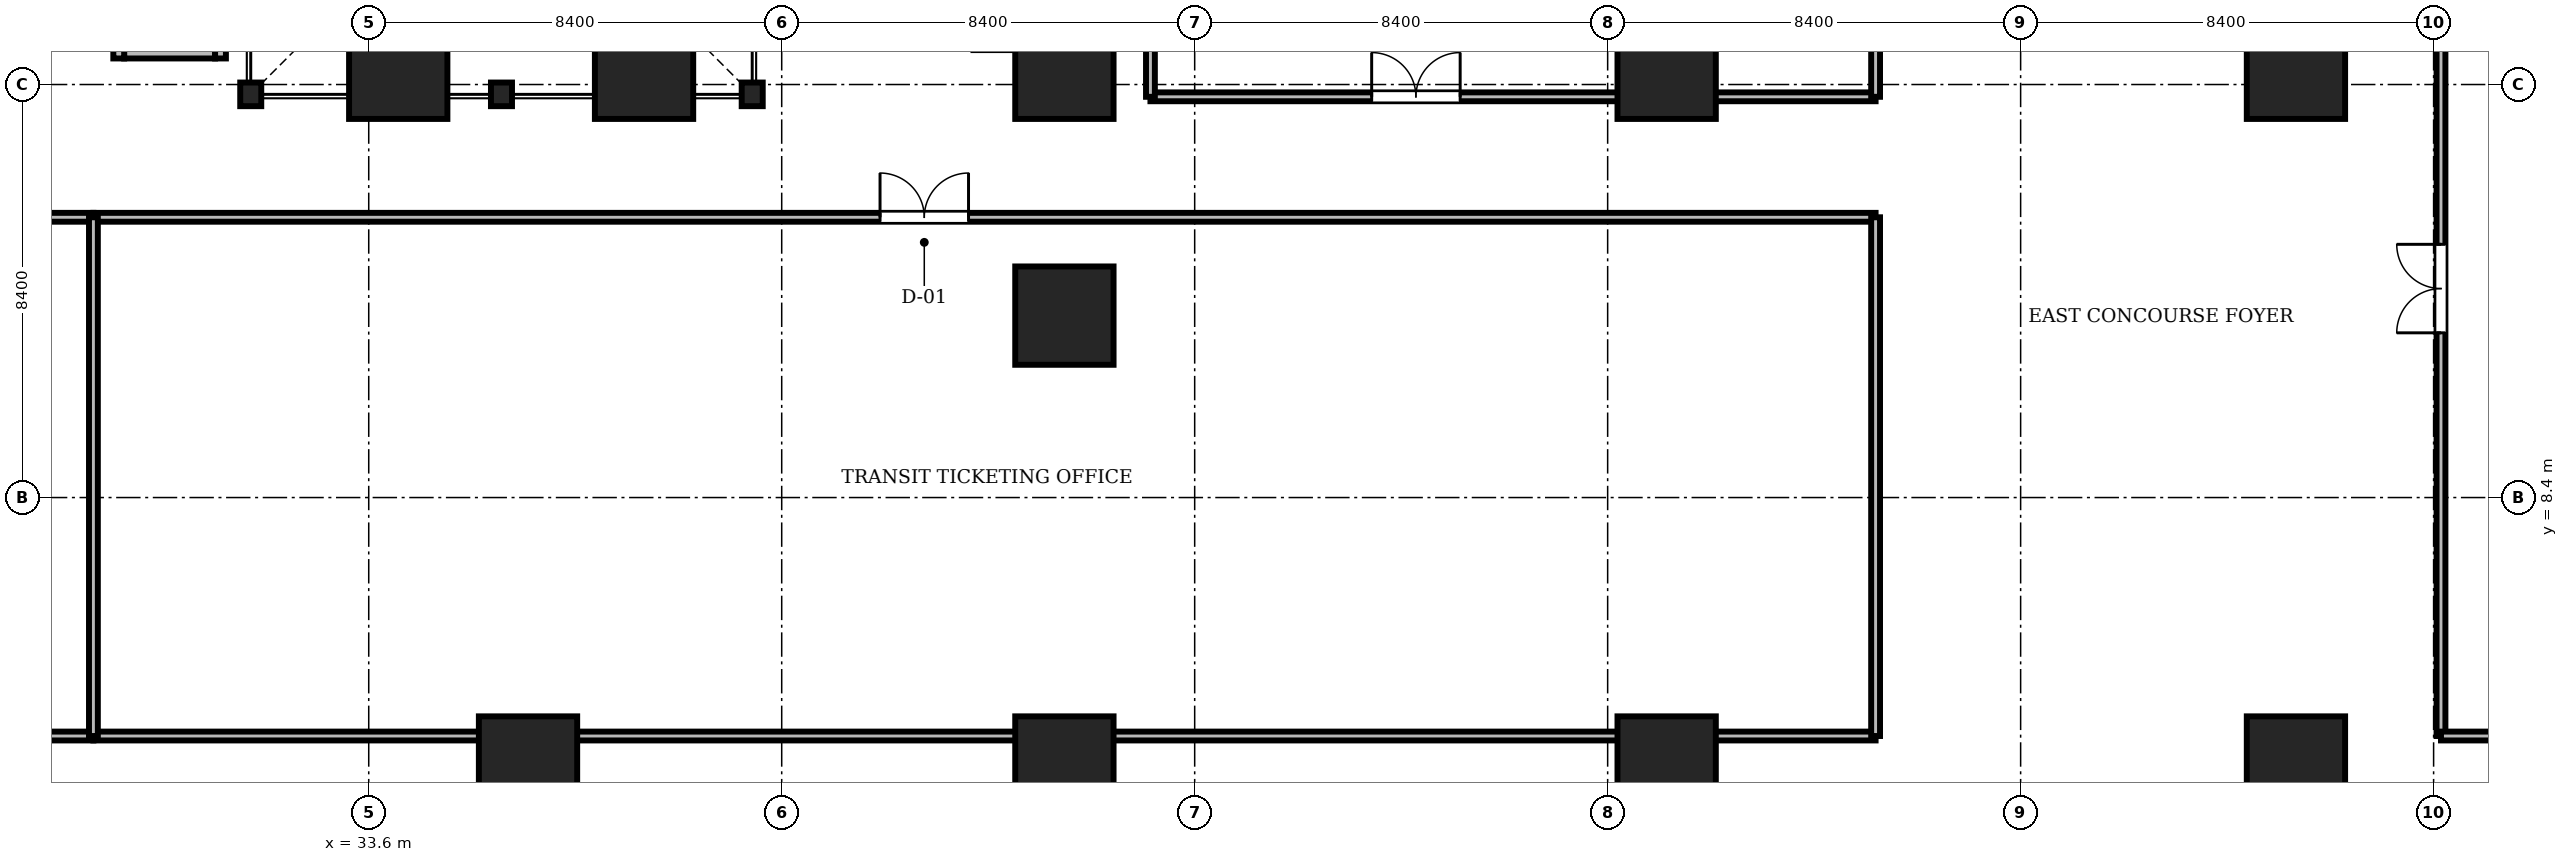
"""IFC4 building model, lengths in metres.
Left out: names, types, materials, properties, quantities, classifications, styles, units other than length and angle.
Written with IfcOpenShell. Run it as: python <this file> out.ifc"""

import sys

from ifc_helpers import new_model, si_unit, direction, frame, frame_2d, origin, origin_2d, place, context, subcontext, project, spatial, rectangle, i_section, extrude, source, transform, mapped, element, fill, save


model = new_model("IFC4")
c1 = context("Model", 3, precision=1e-05, world=origin(), true_north=direction((0.0, 1.0)))
c2 = subcontext(c1, "Body", "Model", "MODEL_VIEW")
j1 = project(units=[si_unit("LENGTHUNIT", "METRE"), si_unit("PLANEANGLEUNIT", "RADIAN")], contexts=[c1])
p1 = place(None, origin())
s1 = spatial("IfcSite", under=j1, at=p1, CompositionType="ELEMENT")
p2 = place(p1, origin())
s2 = spatial("IfcBuilding", under=s1, at=p2, CompositionType="ELEMENT")
p3 = place(p2, frame((0.0, 0.0, 6.0)))
s3 = spatial("IfcBuildingStorey", under=s2, at=p3, CompositionType="ELEMENT", Elevation=6.0)
m1 = source(origin(), c2, "Body", "SweptSolid", [
    extrude(i_section(OverallWidth=0.428, OverallDepth=0.481, WebThickness=0.04, FlangeThickness=0.063, FilletRadius=0.015, at=origin_2d()), origin(), (0.0, 0.0, 1.0), 5.0),
])
for number, where, z_axis, x_axis in (
    (1, (31.2, 16.6, 0.0), (0.0, 0.0, 1.0), (1.0, 0.0, 0.0)),
    (2, (36.3, 16.6, 0.0), (0.0, 0.0, 1.0), (1.0, 0.0, 0.0)),
    (3, (41.4, 16.6, 0.0), (0.0, 0.0, 1.0), (1.0, 0.0, 0.0)),
):
    element("IfcColumn", number, at=place(p3, frame(where, z_axis=z_axis, x_axis=x_axis)), inside=s3, PredefinedType="COLUMN", context=c2, shape_type="MappedRepresentation", body=[
        mapped(m1, transform((0.0, 0.0, 0.0), scale=1.0)),
    ])
m2 = source(origin(), c2, "Body", "SweptSolid", [
    extrude(rectangle(XDim=2.0, YDim=2.0, at=origin_2d()), origin(), (0.0, 0.0, 1.0), 5.0),
])
for number, where, z_axis, x_axis in (
    (4, (36.84, 2.95, 0.0), (0.0, 0.0, 1.0), (1.0, 0.0, 0.0)),
    (5, (47.75, 2.95, 0.0), (0.0, 0.0, 1.0), (1.0, 0.0, 0.0)),
    (6, (60.0, 2.95, 0.0), (0.0, 0.0, 1.0), (1.0, 0.0, 0.0)),
    (7, (72.8, 2.95, 0.0), (0.0, 0.0, 1.0), (1.0, 0.0, 0.0)),
    (8, (47.75, 12.1, 0.0), (0.0, 0.0, 1.0), (1.0, 0.0, 0.0)),
    (9, (34.2, 17.1, 0.0), (0.0, 0.0, 1.0), (1.0, 0.0, 0.0)),
    (10, (39.2, 17.1, 0.0), (0.0, 0.0, 1.0), (1.0, 0.0, 0.0)),
    (11, (47.75, 17.1, 0.0), (0.0, 0.0, 1.0), (1.0, 0.0, 0.0)),
    (12, (60.0, 17.1, 0.0), (0.0, 0.0, 1.0), (1.0, 0.0, 0.0)),
    (13, (72.8, 17.1, 0.0), (0.0, 0.0, 1.0), (1.0, 0.0, 0.0)),
):
    element("IfcColumn", number, at=place(p3, frame(where, z_axis=z_axis, x_axis=x_axis)), inside=s3, PredefinedType="COLUMN", context=c2, shape_type="MappedRepresentation", body=[
        mapped(m2, transform((0.0, 0.0, 0.0), scale=1.0)),
    ])
m3 = source(origin(), c2, "Body", "SweptSolid", [
    extrude(rectangle(XDim=1.85, YDim=0.22, at=frame_2d((0.925, 0.0))), origin(), (0.0, 0.0, 1.0), 5.0),
])
p4 = place(p3, frame((28.625, 17.44, 0.0), z_axis=(0.0, 0.0, 1.0), x_axis=(1.0, 0.0, 0.0)))
e14 = element("IfcWall", 14, at=p4, inside=s3, PredefinedType="SOLIDWALL", context=c2, shape_type="MappedRepresentation", body=[
    mapped(m3, transform((0.0, 0.0, 0.0), scale=1.0)),
])
m4 = source(origin(), c2, "Body", "SweptSolid", [
    extrude(rectangle(XDim=2.54, YDim=0.22, at=frame_2d((1.27, 0.0))), origin(), (0.0, 0.0, 1.0), 5.0),
])
for number, where, z_axis, x_axis in (
    (15, (28.515, 17.33, 0.0), (0.0, 0.0, 1.0), (0.0, 1.0, 0.0)),
    (16, (30.585, 17.33, 0.0), (0.0, 0.0, 1.0), (0.0, 1.0, 0.0)),
):
    element("IfcWall", number, at=place(p3, frame(where, z_axis=z_axis, x_axis=x_axis)), inside=s3, PredefinedType="SOLIDWALL", context=c2, shape_type="MappedRepresentation", body=[
        mapped(m4, transform((0.0, 0.0, 0.0), scale=1.0)),
    ])
m5 = source(origin(), c2, "Body", "SweptSolid", [
    extrude(rectangle(XDim=36.25, YDim=0.18, at=frame_2d((18.125, 0.0))), origin(), (0.0, 0.0, 1.0), 4.392),
])
p5 = place(p3, frame((28.0, 14.1, 0.0), z_axis=(0.0, 0.0, 1.0), x_axis=(1.0, 0.0, 0.0)))
e17 = element("IfcWall", 17, at=p5, inside=s3, PredefinedType="PARTITIONING", context=c2, shape_type="MappedRepresentation", body=[
    mapped(m5, transform((0.0, 0.0, 0.0), scale=1.0)),
])
m6 = source(origin(), c2, "Body", "SweptSolid", [
    extrude(rectangle(XDim=1.8, YDim=2.4, at=frame_2d((0.9, 1.2))), frame((0.0, 0.1, 0.0), z_axis=(0.0, -1.0, 0.0), x_axis=(1.0, 0.0, 0.0)), (0.0, 0.0, 1.0), 0.2),
])
p6 = place(p5, frame((16.0, 0.0, 0.0)))
e18 = element("IfcOpeningElement", 18, at=p6, cuts=e17, PredefinedType="OPENING", context=c2, shape_type="MappedRepresentation", body=[
    mapped(m6, transform((0.0, 0.0, 0.0), scale=1.0)),
])
m7 = source(origin(), c2, "Body", "SweptSolid", [
    extrude(rectangle(XDim=25.7, YDim=0.18, at=frame_2d((12.85, 0.0))), origin(), (0.0, 0.0, 1.0), 4.468),
])
p7 = place(p3, frame((75.75, 3.55, 0.0), z_axis=(0.0, 0.0, 1.0), x_axis=(0.0, 1.0, 0.0)))
e19 = element("IfcWall", 19, at=p7, inside=s3, PredefinedType="PARTITIONING", context=c2, shape_type="MappedRepresentation", body=[
    mapped(m7, transform((0.0, 0.0, 0.0), scale=1.0)),
])
p8 = place(p7, frame((8.2, 0.0, 0.0)))
e20 = element("IfcOpeningElement", 20, at=p8, cuts=e19, PredefinedType="OPENING", context=c2, shape_type="MappedRepresentation", body=[
    mapped(m6, transform((0.0, 0.0, 0.0), scale=1.0)),
])
m8 = source(origin(), c2, "Body", "SweptSolid", [
    extrude(rectangle(XDim=24.25, YDim=0.18, at=frame_2d((12.125, 0.0))), origin(), (0.0, 0.0, 1.0), 4.392),
])
p9 = place(p3, frame((3.75, 14.1, 0.0), z_axis=(0.0, 0.0, 1.0), x_axis=(1.0, 0.0, 0.0)))
e21 = element("IfcWall", 21, at=p9, inside=s3, PredefinedType="PARTITIONING", context=c2, shape_type="MappedRepresentation", body=[
    mapped(m8, transform((0.0, 0.0, 0.0), scale=1.0)),
])
p10 = place(p9, frame((18.0, 0.0, 0.0)))
e22 = element("IfcOpeningElement", 22, at=p10, cuts=e21, PredefinedType="OPENING", context=c2, shape_type="MappedRepresentation", body=[
    mapped(m6, transform((0.0, 0.0, 0.0), scale=1.0)),
])
m9 = source(origin(), c2, "Body", "SweptSolid", [
    extrude(rectangle(XDim=14.75, YDim=0.18, at=frame_2d((7.375, 0.0))), origin(), (0.0, 0.0, 1.0), 4.392),
])
p11 = place(p3, frame((49.5, 16.55, 0.0), z_axis=(0.0, 0.0, 1.0), x_axis=(1.0, 0.0, 0.0)))
e23 = element("IfcWall", 23, at=p11, inside=s3, PredefinedType="PARTITIONING", context=c2, shape_type="MappedRepresentation", body=[
    mapped(m9, transform((0.0, 0.0, 0.0), scale=1.0)),
])
p12 = place(p11, frame((4.5, 0.0, 0.0)))
e24 = element("IfcOpeningElement", 24, at=p12, cuts=e23, PredefinedType="OPENING", context=c2, shape_type="MappedRepresentation", body=[
    mapped(m6, transform((0.0, 0.0, 0.0), scale=1.0)),
])
p13 = place(p3, frame((28.0, 3.55, 0.0), z_axis=(0.0, 0.0, 1.0), x_axis=(1.0, 0.0, 0.0)))
e25 = element("IfcWall", 25, at=p13, inside=s3, PredefinedType="PARTITIONING", context=c2, shape_type="MappedRepresentation", body=[
    mapped(m5, transform((0.0, 0.0, 0.0), scale=1.0)),
])
p14 = place(p3, frame((3.75, 3.55, 0.0), z_axis=(0.0, 0.0, 1.0), x_axis=(1.0, 0.0, 0.0)))
e26 = element("IfcWall", 26, at=p14, inside=s3, PredefinedType="PARTITIONING", context=c2, shape_type="MappedRepresentation", body=[
    mapped(m8, transform((0.0, 0.0, 0.0), scale=1.0)),
])
m10 = source(origin(), c2, "Body", "SweptSolid", [
    extrude(rectangle(XDim=11.75, YDim=0.18, at=frame_2d((5.875, 0.0))), origin(), (0.0, 0.0, 1.0), 4.468),
])
for number, where, z_axis, x_axis in (
    (27, (49.5, 16.55, 0.0), (0.0, 0.0, 1.0), (0.0, 1.0, 0.0)),
    (28, (64.25, 16.55, 0.0), (0.0, 0.0, 1.0), (0.0, 1.0, 0.0)),
):
    element("IfcWall", number, at=place(p3, frame(where, z_axis=z_axis, x_axis=x_axis)), inside=s3, PredefinedType="PARTITIONING", context=c2, shape_type="MappedRepresentation", body=[
        mapped(m10, transform((0.0, 0.0, 0.0), scale=1.0)),
    ])
m11 = source(origin(), c2, "Body", "SweptSolid", [
    extrude(rectangle(XDim=10.55, YDim=0.18, at=frame_2d((5.275, 0.0))), origin(), (0.0, 0.0, 1.0), 5.0),
])
p15 = place(p3, frame((28.0, 3.55, 0.0), z_axis=(0.0, 0.0, 1.0), x_axis=(0.0, 1.0, 0.0)))
e29 = element("IfcWall", 29, at=p15, inside=s3, PredefinedType="PARTITIONING", context=c2, shape_type="MappedRepresentation", body=[
    mapped(m11, transform((0.0, 0.0, 0.0), scale=1.0)),
])
m12 = source(origin(), c2, "Body", "SweptSolid", [
    extrude(rectangle(XDim=10.55, YDim=0.18, at=frame_2d((5.275, 0.0))), origin(), (0.0, 0.0, 1.0), 4.592),
])
p16 = place(p3, frame((64.25, 3.55, 0.0), z_axis=(0.0, 0.0, 1.0), x_axis=(0.0, 1.0, 0.0)))
e30 = element("IfcWall", 30, at=p16, inside=s3, PredefinedType="PARTITIONING", context=c2, shape_type="MappedRepresentation", body=[
    mapped(m12, transform((0.0, 0.0, 0.0), scale=1.0)),
])
m13 = source(origin(), c2, "Body", "SweptSolid", [
    extrude(rectangle(XDim=6.5, YDim=0.18, at=frame_2d((3.25, 0.0))), origin(), (0.0, 0.0, 1.0), 4.392),
])
p17 = place(p3, frame((75.75, 3.55, 0.0), z_axis=(0.0, 0.0, 1.0), x_axis=(1.0, 0.0, 0.0)))
e31 = element("IfcWall", 31, at=p17, inside=s3, PredefinedType="PARTITIONING", context=c2, shape_type="MappedRepresentation", body=[
    mapped(m13, transform((0.0, 0.0, 0.0), scale=1.0)),
])
m14 = source(origin(), c2, "Body", "SweptSolid", [
    extrude(rectangle(XDim=1.8, YDim=2.4, at=frame_2d((0.9, 1.2))), frame((0.0, 0.025, 0.0), z_axis=(0.0, -1.0, 0.0), x_axis=(1.0, 0.0, 0.0)), (0.0, 0.0, 1.0), 0.05),
])
p18 = place(p6, origin())
e32 = element("IfcDoor", 32, at=p18, inside=s3, OperationType="DOUBLE_DOOR_SINGLE_SWING", PredefinedType="DOOR", context=c2, shape_type="MappedRepresentation", body=[
    mapped(m14, transform((0.0, 0.0, 0.0), scale=1.0)),
])
fill(e18, e32)
p19 = place(p8, origin())
e33 = element("IfcDoor", 33, at=p19, inside=s3, OperationType="DOUBLE_DOOR_SINGLE_SWING", PredefinedType="DOOR", context=c2, shape_type="MappedRepresentation", body=[
    mapped(m14, transform((0.0, 0.0, 0.0), scale=1.0)),
])
fill(e20, e33)
p20 = place(p12, origin())
e34 = element("IfcDoor", 34, at=p20, inside=s3, OperationType="DOUBLE_DOOR_SINGLE_SWING", PredefinedType="DOOR", context=c2, shape_type="MappedRepresentation", body=[
    mapped(m14, transform((0.0, 0.0, 0.0), scale=1.0)),
])
fill(e24, e34)
save(model, sys.argv[1])
